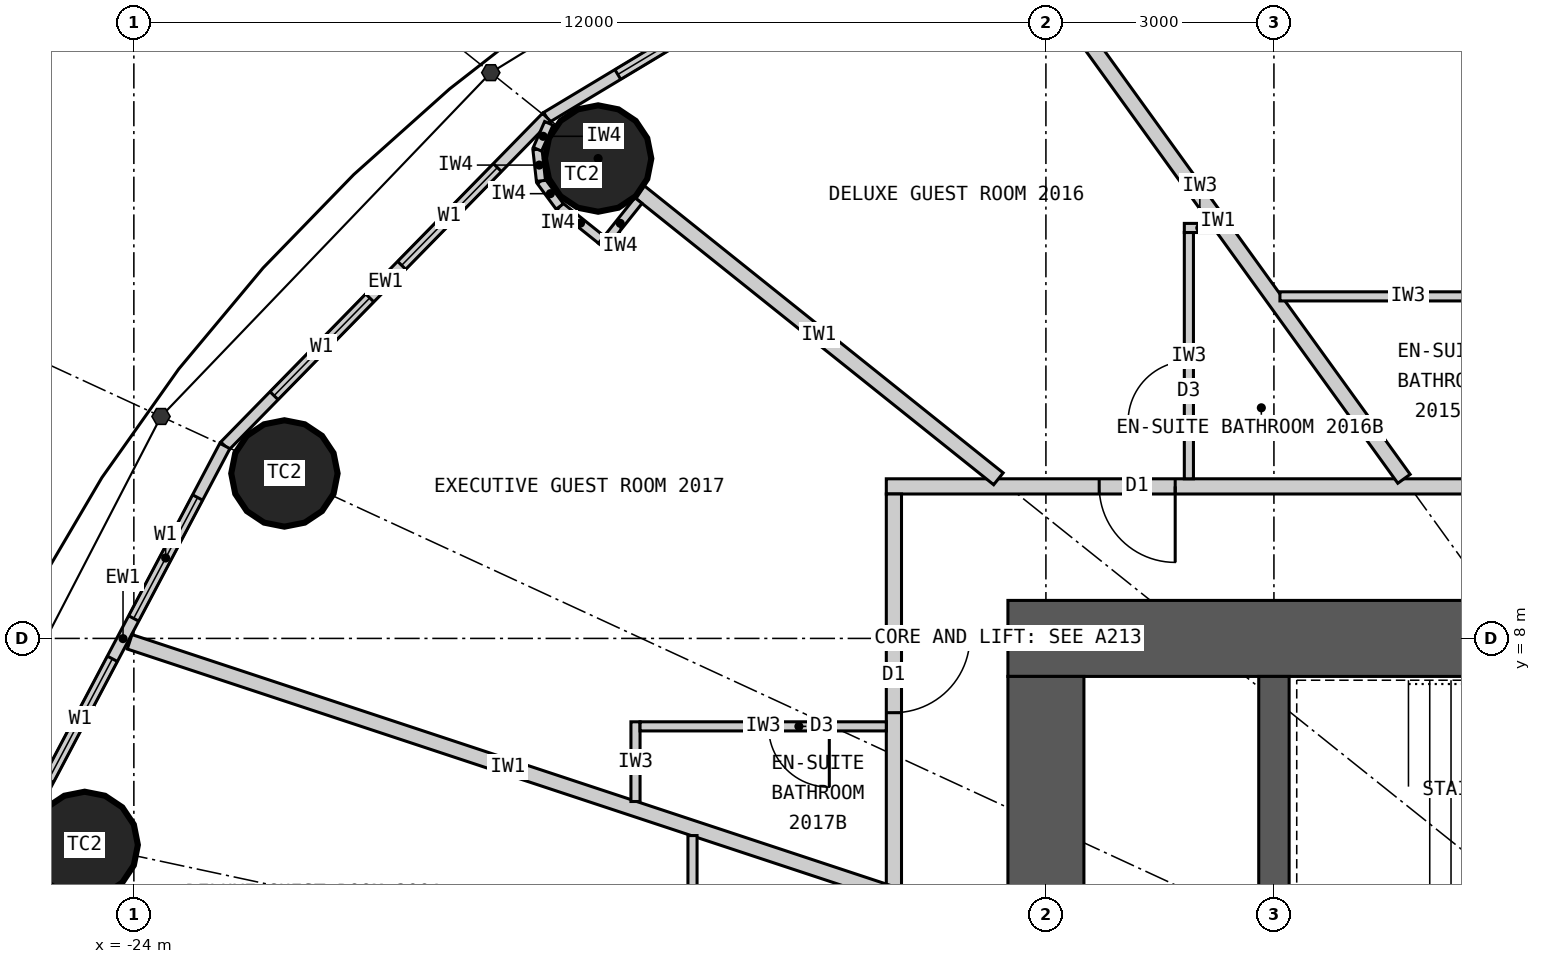
"""IFC4 building model, lengths in metres.
Left out: names, types, materials, properties, quantities, classifications, styles, units other than length and angle.
Written with IfcOpenShell. Run it as: python <this file> out.ifc"""

import sys

from ifc_helpers import new_model, si_unit, direction, frame, frame_2d, origin, origin_2d, place, context, subcontext, project, spatial, rectangle, circle, extrude, element, fill, save


model = new_model("IFC4")
c1 = context("Model", 3, precision=1e-05, world=origin(), true_north=direction((0.0, 1.0)))
c2 = subcontext(c1, "Body", "Model", "MODEL_VIEW")
j1 = project(units=[si_unit("LENGTHUNIT", "METRE"), si_unit("PLANEANGLEUNIT", "RADIAN")], contexts=[c1])
p1 = place(None, origin())
s1 = spatial("IfcSite", under=j1, at=p1, CompositionType="ELEMENT")
p2 = place(p1, origin())
s2 = spatial("IfcBuilding", under=s1, at=p2, CompositionType="ELEMENT")
p3 = place(p2, frame((0.0, 0.0, 80.4)))
s3 = spatial("IfcBuildingStorey", under=s2, at=p3, CompositionType="ELEMENT", Elevation=80.4)
for number, where, z_axis, x_axis in (
    (1, (-17.892, 14.313, 0.0), (0.0, 0.0, 1.0), (1.0, 0.0, 0.0)),
    (2, (-22.019, 10.17, 0.0), (0.0, 0.0, 1.0), (1.0, 0.0, 0.0)),
    (3, (-24.647, 5.283, 0.0), (0.0, 0.0, 1.0), (1.0, 0.0, 0.0)),
):
    element("IfcColumn", number, at=place(p3, frame(where, z_axis=z_axis, x_axis=x_axis)), inside=s3, PredefinedType="COLUMN", context=c2, shape_type="SweptSolid", body=[
        extrude(circle(Radius=0.7, at=origin_2d()), origin(), (0.0, 0.0, 1.0), 3.3),
    ])
p4 = place(p3, frame((-12.5, 8.0, 0.0), z_axis=(0.0, 0.0, 1.0), x_axis=(1.0, 0.0, 0.0)))
e4 = element("IfcWall", 4, at=p4, inside=s3, PredefinedType="SHEAR", context=c2, shape_type="SweptSolid", body=[
    extrude(rectangle(XDim=25.0, YDim=1.0, at=frame_2d((12.5, 0.0))), origin(), (0.0, 0.0, 1.0), 3.3),
])
p5 = place(p4, frame((11.2, 0.0, 0.0)))
e5 = element("IfcOpeningElement", 5, at=p5, cuts=e4, PredefinedType="OPENING", context=c2, shape_type="SweptSolid", body=[
    extrude(rectangle(XDim=1.2, YDim=2.2, at=frame_2d((0.6, 1.1))), frame((0.0, 0.51, 0.0), z_axis=(0.0, -1.0, 0.0), x_axis=(1.0, 0.0, 0.0)), (0.0, 0.0, 1.0), 1.02),
])
p6 = place(p4, frame((18.8, 0.0, 0.0)))
e6 = element("IfcOpeningElement", 6, at=p6, cuts=e4, PredefinedType="OPENING", context=c2, shape_type="SweptSolid", body=[
    extrude(rectangle(XDim=0.9, YDim=2.2, at=frame_2d((0.45, 1.1))), frame((0.0, 0.51, 0.0), z_axis=(0.0, -1.0, 0.0), x_axis=(1.0, 0.0, 0.0)), (0.0, 0.0, 1.0), 1.02),
])
p7 = place(p3, frame((-12.0, 7.5, 0.0), z_axis=(0.0, 0.0, 1.0), x_axis=(0.0, -1.0, 0.0)))
e7 = element("IfcWall", 7, at=p7, inside=s3, PredefinedType="SHEAR", context=c2, shape_type="SweptSolid", body=[
    extrude(rectangle(XDim=15.0, YDim=1.0, at=frame_2d((7.5, 0.0))), origin(), (0.0, 0.0, 1.0), 3.3),
])
p8 = place(p7, frame((6.6, 0.0, 0.0)))
e8 = element("IfcOpeningElement", 8, at=p8, cuts=e7, PredefinedType="OPENING", context=c2, shape_type="SweptSolid", body=[
    extrude(rectangle(XDim=1.8, YDim=2.2, at=frame_2d((0.9, 1.1))), frame((0.0, 0.51, 0.0), z_axis=(0.0, -1.0, 0.0), x_axis=(1.0, 0.0, 0.0)), (0.0, 0.0, 1.0), 1.02),
])
p9 = place(p3, frame((-9.0, 4.5, 0.0), z_axis=(0.0, 0.0, 1.0), x_axis=(0.0, 1.0, 0.0)))
e9 = element("IfcWall", 9, at=p9, inside=s3, PredefinedType="SHEAR", context=c2, shape_type="SweptSolid", body=[
    extrude(rectangle(XDim=3.0, YDim=0.4, at=frame_2d((1.5, 0.0))), origin(), (0.0, 0.0, 1.0), 3.3),
])
p10 = place(p3, frame((-13.096, 18.147, 0.0), z_axis=(0.0, 0.0, 1.0), x_axis=(-0.856983180864, -0.515344377787, 0.0)))
e10 = element("IfcWall", 10, at=p10, inside=s3, PredefinedType="ELEMENTEDWALL", context=c2, shape_type="SweptSolid", body=[
    extrude(rectangle(XDim=6.386, YDim=0.15, at=frame_2d((3.193, 0.0))), origin(), (0.0, 0.0, 1.0), 3.12),
])
p11 = place(p10, frame((1.093, 0.0, 0.9)))
e11 = element("IfcOpeningElement", 11, at=p11, cuts=e10, PredefinedType="OPENING", context=c2, shape_type="SweptSolid", body=[
    extrude(rectangle(XDim=1.8, YDim=1.9, at=frame_2d((0.9, 0.95))), frame((0.0, 0.085, 0.0), z_axis=(0.0, -1.0, 0.0), x_axis=(1.0, 0.0, 0.0)), (0.0, 0.0, 1.0), 0.17),
])
p12 = place(p10, frame((3.493, 0.0, 0.9)))
e12 = element("IfcOpeningElement", 12, at=p12, cuts=e10, PredefinedType="OPENING", context=c2, shape_type="SweptSolid", body=[
    extrude(rectangle(XDim=1.8, YDim=1.9, at=frame_2d((0.9, 0.95))), frame((0.0, 0.085, 0.0), z_axis=(0.0, -1.0, 0.0), x_axis=(1.0, 0.0, 0.0)), (0.0, 0.0, 1.0), 0.17),
])
p13 = place(p3, frame((-18.57, 14.856, 0.0), z_axis=(0.0, 0.0, 1.0), x_axis=(-0.699602905915, -0.714531856557, 0.0)))
e13 = element("IfcWall", 13, at=p13, inside=s3, PredefinedType="ELEMENTEDWALL", context=c2, shape_type="SweptSolid", body=[
    extrude(rectangle(XDim=6.051, YDim=0.15, at=frame_2d((3.025, 0.0))), origin(), (0.0, 0.0, 1.0), 3.12),
])
p14 = place(p13, frame((0.926, 0.0, 0.9)))
e14 = element("IfcOpeningElement", 14, at=p14, cuts=e13, PredefinedType="OPENING", context=c2, shape_type="SweptSolid", body=[
    extrude(rectangle(XDim=1.8, YDim=1.9, at=frame_2d((0.9, 0.95))), frame((0.0, 0.085, 0.0), z_axis=(0.0, -1.0, 0.0), x_axis=(1.0, 0.0, 0.0)), (0.0, 0.0, 1.0), 0.17),
])
p15 = place(p13, frame((3.325, 0.0, 0.9)))
e15 = element("IfcOpeningElement", 15, at=p15, cuts=e13, PredefinedType="OPENING", context=c2, shape_type="SweptSolid", body=[
    extrude(rectangle(XDim=1.8, YDim=1.9, at=frame_2d((0.9, 0.95))), frame((0.0, 0.085, 0.0), z_axis=(0.0, -1.0, 0.0), x_axis=(1.0, 0.0, 0.0)), (0.0, 0.0, 1.0), 0.17),
])
p16 = place(p3, frame((-22.803, 10.532, 0.0), z_axis=(0.0, 0.0, 1.0), x_axis=(-0.467296867008, -0.884100468321, 0.0)))
e16 = element("IfcWall", 16, at=p16, inside=s3, PredefinedType="ELEMENTEDWALL", context=c2, shape_type="SweptSolid", body=[
    extrude(rectangle(XDim=5.734, YDim=0.15, at=frame_2d((2.867, 0.0))), origin(), (0.0, 0.0, 1.0), 3.12),
])
p17 = place(p16, frame((0.767, 0.0, 0.9)))
e17 = element("IfcOpeningElement", 17, at=p17, cuts=e16, PredefinedType="OPENING", context=c2, shape_type="SweptSolid", body=[
    extrude(rectangle(XDim=1.8, YDim=1.9, at=frame_2d((0.9, 0.95))), frame((0.0, 0.085, 0.0), z_axis=(0.0, -1.0, 0.0), x_axis=(1.0, 0.0, 0.0)), (0.0, 0.0, 1.0), 0.17),
])
p18 = place(p16, frame((3.167, 0.0, 0.9)))
e18 = element("IfcOpeningElement", 18, at=p18, cuts=e16, PredefinedType="OPENING", context=c2, shape_type="SweptSolid", body=[
    extrude(rectangle(XDim=1.8, YDim=1.9, at=frame_2d((0.9, 0.95))), frame((0.0, 0.085, 0.0), z_axis=(0.0, -1.0, 0.0), x_axis=(1.0, 0.0, 0.0)), (0.0, 0.0, 1.0), 0.17),
])
p19 = place(p3, frame((-14.1, 10.0, 0.0), z_axis=(0.0, 0.0, 1.0), x_axis=(1.0, 0.0, 0.0)))
e19 = element("IfcWall", 19, at=p19, inside=s3, PredefinedType="PARTITIONING", context=c2, shape_type="SweptSolid", body=[
    extrude(rectangle(XDim=28.2, YDim=0.2, at=frame_2d((14.1, 0.0))), origin(), (0.0, 0.0, 1.0), 3.12),
])
p20 = place(p19, frame((23.865, 0.0, 0.0)))
e20 = element("IfcOpeningElement", 20, at=p20, cuts=e19, PredefinedType="OPENING", context=c2, shape_type="SweptSolid", body=[
    extrude(rectangle(XDim=1.0, YDim=2.2, at=frame_2d((0.5, 1.1))), frame((0.0, 0.11, 0.0), z_axis=(0.0, -1.0, 0.0), x_axis=(1.0, 0.0, 0.0)), (0.0, 0.0, 1.0), 0.22),
])
p21 = place(p19, frame((18.529, 0.0, 0.0)))
e21 = element("IfcOpeningElement", 21, at=p21, cuts=e19, PredefinedType="OPENING", context=c2, shape_type="SweptSolid", body=[
    extrude(rectangle(XDim=1.0, YDim=2.2, at=frame_2d((0.5, 1.1))), frame((0.0, 0.11, 0.0), z_axis=(0.0, -1.0, 0.0), x_axis=(1.0, 0.0, 0.0)), (0.0, 0.0, 1.0), 0.22),
])
p22 = place(p19, frame((14.623, 0.0, 0.0)))
e22 = element("IfcOpeningElement", 22, at=p22, cuts=e19, PredefinedType="OPENING", context=c2, shape_type="SweptSolid", body=[
    extrude(rectangle(XDim=1.0, YDim=2.2, at=frame_2d((0.5, 1.1))), frame((0.0, 0.11, 0.0), z_axis=(0.0, -1.0, 0.0), x_axis=(1.0, 0.0, 0.0)), (0.0, 0.0, 1.0), 0.22),
])
p23 = place(p19, frame((11.24, 0.0, 0.0)))
e23 = element("IfcOpeningElement", 23, at=p23, cuts=e19, PredefinedType="OPENING", context=c2, shape_type="SweptSolid", body=[
    extrude(rectangle(XDim=1.0, YDim=2.2, at=frame_2d((0.5, 1.1))), frame((0.0, 0.11, 0.0), z_axis=(0.0, -1.0, 0.0), x_axis=(1.0, 0.0, 0.0)), (0.0, 0.0, 1.0), 0.22),
])
p24 = place(p19, frame((8.671, 0.0, 0.0)))
e24 = element("IfcOpeningElement", 24, at=p24, cuts=e19, PredefinedType="OPENING", context=c2, shape_type="SweptSolid", body=[
    extrude(rectangle(XDim=1.0, YDim=2.2, at=frame_2d((0.5, 1.1))), frame((0.0, 0.11, 0.0), z_axis=(0.0, -1.0, 0.0), x_axis=(1.0, 0.0, 0.0)), (0.0, 0.0, 1.0), 0.22),
])
p25 = place(p19, frame((2.801, 0.0, 0.0)))
e25 = element("IfcOpeningElement", 25, at=p25, cuts=e19, PredefinedType="OPENING", context=c2, shape_type="SweptSolid", body=[
    extrude(rectangle(XDim=1.0, YDim=2.2, at=frame_2d((0.5, 1.1))), frame((0.0, 0.11, 0.0), z_axis=(0.0, -1.0, 0.0), x_axis=(1.0, 0.0, 0.0)), (0.0, 0.0, 1.0), 0.22),
])
p26 = place(p3, frame((-14.0, 9.9, 0.0), z_axis=(0.0, 0.0, 1.0), x_axis=(0.0, -1.0, 0.0)))
e26 = element("IfcWall", 26, at=p26, inside=s3, PredefinedType="PARTITIONING", context=c2, shape_type="SweptSolid", body=[
    extrude(rectangle(XDim=19.8, YDim=0.2, at=frame_2d((9.9, 0.0))), origin(), (0.0, 0.0, 1.0), 3.12),
])
p27 = place(p26, frame((7.097, 0.0, 0.0)))
e27 = element("IfcOpeningElement", 27, at=p27, cuts=e26, PredefinedType="OPENING", context=c2, shape_type="SweptSolid", body=[
    extrude(rectangle(XDim=1.0, YDim=2.2, at=frame_2d((0.5, 1.1))), frame((0.0, 0.11, 0.0), z_axis=(0.0, -1.0, 0.0), x_axis=(1.0, 0.0, 0.0)), (0.0, 0.0, 1.0), 0.22),
])
p28 = place(p26, frame((10.778, 0.0, 0.0)))
e28 = element("IfcOpeningElement", 28, at=p28, cuts=e26, PredefinedType="OPENING", context=c2, shape_type="SweptSolid", body=[
    extrude(rectangle(XDim=1.0, YDim=2.2, at=frame_2d((0.5, 1.1))), frame((0.0, 0.11, 0.0), z_axis=(0.0, -1.0, 0.0), x_axis=(1.0, 0.0, 0.0)), (0.0, 0.0, 1.0), 0.22),
])
p29 = place(p26, frame((13.552, 0.0, 0.0)))
e29 = element("IfcOpeningElement", 29, at=p29, cuts=e26, PredefinedType="OPENING", context=c2, shape_type="SweptSolid", body=[
    extrude(rectangle(XDim=1.0, YDim=2.2, at=frame_2d((0.5, 1.1))), frame((0.0, 0.11, 0.0), z_axis=(0.0, -1.0, 0.0), x_axis=(1.0, 0.0, 0.0)), (0.0, 0.0, 1.0), 0.22),
])
p30 = place(p26, frame((18.698, 0.0, 0.0)))
e30 = element("IfcOpeningElement", 30, at=p30, cuts=e26, PredefinedType="OPENING", context=c2, shape_type="SweptSolid", body=[
    extrude(rectangle(XDim=1.0, YDim=2.2, at=frame_2d((0.5, 1.1))), frame((0.0, 0.11, 0.0), z_axis=(0.0, -1.0, 0.0), x_axis=(1.0, 0.0, 0.0)), (0.0, 0.0, 1.0), 0.22),
])
p31 = place(p26, frame((1.877, 0.0, 0.0)))
e31 = element("IfcOpeningElement", 31, at=p31, cuts=e26, PredefinedType="OPENING", context=c2, shape_type="SweptSolid", body=[
    extrude(rectangle(XDim=1.0, YDim=2.2, at=frame_2d((0.5, 1.1))), frame((0.0, 0.11, 0.0), z_axis=(0.0, -1.0, 0.0), x_axis=(1.0, 0.0, 0.0)), (0.0, 0.0, 1.0), 0.22),
])
p32 = place(p3, frame((-7.289, 10.1, 0.0), z_axis=(0.0, 0.0, 1.0), x_axis=(-0.585198353053, 0.810890182197, 0.0)))
e32 = element("IfcWall", 32, at=p32, inside=s3, PredefinedType="PARTITIONING", context=c2, shape_type="SweptSolid", body=[
    extrude(rectangle(XDim=8.36, YDim=0.2, at=frame_2d((4.18, 0.0))), origin(), (0.0, 0.0, 1.0), 2.32),
])
p33 = place(p3, frame((-12.625, 10.1, 0.0), z_axis=(0.0, 0.0, 1.0), x_axis=(-0.780892451574, 0.624665493744, 0.0)))
e33 = element("IfcWall", 33, at=p33, inside=s3, PredefinedType="PARTITIONING", context=c2, shape_type="SweptSolid", body=[
    extrude(rectangle(XDim=6.045, YDim=0.2, at=frame_2d((3.022, 0.0))), origin(), (0.0, 0.0, 1.0), 2.32),
])
p34 = place(p3, frame((-14.1, 4.663, 0.0), z_axis=(0.0, 0.0, 1.0), x_axis=(-0.949432655039, 0.31397075269, 0.0)))
e34 = element("IfcWall", 34, at=p34, inside=s3, PredefinedType="PARTITIONING", context=c2, shape_type="SweptSolid", body=[
    extrude(rectangle(XDim=10.486, YDim=0.2, at=frame_2d((5.243, 0.0))), origin(), (0.0, 0.0, 1.0), 3.12),
])
p35 = place(p3, frame((-16.65, 5.406, 0.0), z_axis=(0.0, 0.0, 1.0), x_axis=(0.0, -1.0, 0.0)))
e35 = element("IfcWall", 35, at=p35, inside=s3, PredefinedType="PARTITIONING", context=c2, shape_type="SweptSolid", body=[
    extrude(rectangle(XDim=2.483, YDim=0.12, at=frame_2d((1.242, 0.0))), origin(), (0.0, 0.0, 1.0), 3.12),
])
p36 = place(p3, frame((-8.921, 12.5, 0.0), z_axis=(0.0, 0.0, 1.0), x_axis=(1.0, 0.0, 0.0)))
e36 = element("IfcWall", 36, at=p36, inside=s3, PredefinedType="PARTITIONING", context=c2, shape_type="SweptSolid", body=[
    extrude(rectangle(XDim=3.372, YDim=0.12, at=frame_2d((1.686, 0.0))), origin(), (0.0, 0.0, 1.0), 3.12),
])
p37 = place(p3, frame((-9.771, 13.4, 0.0), z_axis=(0.0, 0.0, 1.0), x_axis=(-1.0, 0.0, 0.0)))
e37 = element("IfcWall", 37, at=p37, inside=s3, PredefinedType="PARTITIONING", context=c2, shape_type="SweptSolid", body=[
    extrude(rectangle(XDim=0.408, YDim=0.12, at=frame_2d((0.204, 0.0))), origin(), (0.0, 0.0, 1.0), 3.12),
])
p38 = place(p3, frame((-10.119, 10.1, 0.0), z_axis=(0.0, 0.0, 1.0), x_axis=(0.0, 1.0, 0.0)))
e38 = element("IfcWall", 38, at=p38, inside=s3, PredefinedType="PARTITIONING", context=c2, shape_type="SweptSolid", body=[
    extrude(rectangle(XDim=3.24, YDim=0.12, at=frame_2d((1.62, 0.0))), origin(), (0.0, 0.0, 1.0), 3.12),
])
p39 = place(p38, frame((0.75, 0.0, 0.0)))
e39 = element("IfcOpeningElement", 39, at=p39, cuts=e38, PredefinedType="OPENING", context=c2, shape_type="SweptSolid", body=[
    extrude(rectangle(XDim=0.8, YDim=2.1, at=frame_2d((0.4, 1.05))), frame((0.0, 0.07, 0.0), z_axis=(0.0, -1.0, 0.0), x_axis=(1.0, 0.0, 0.0)), (0.0, 0.0, 1.0), 0.14),
])
p40 = place(p3, frame((-17.4, 5.854, 0.0), z_axis=(0.0, 0.0, 1.0), x_axis=(0.0, 1.0, 0.0)))
e40 = element("IfcWall", 40, at=p40, inside=s3, PredefinedType="PARTITIONING", context=c2, shape_type="SweptSolid", body=[
    extrude(rectangle(XDim=1.049, YDim=0.12, at=frame_2d((0.524, 0.0))), origin(), (0.0, 0.0, 1.0), 3.12),
])
p41 = place(p3, frame((-14.1, 6.843, 0.0), z_axis=(0.0, 0.0, 1.0), x_axis=(-1.0, 0.0, 0.0)))
e41 = element("IfcWall", 41, at=p41, inside=s3, PredefinedType="PARTITIONING", context=c2, shape_type="SweptSolid", body=[
    extrude(rectangle(XDim=3.24, YDim=0.12, at=frame_2d((1.62, 0.0))), origin(), (0.0, 0.0, 1.0), 3.12),
])
p42 = place(p41, frame((0.75, 0.0, 0.0)))
e42 = element("IfcOpeningElement", 42, at=p42, cuts=e41, PredefinedType="OPENING", context=c2, shape_type="SweptSolid", body=[
    extrude(rectangle(XDim=0.8, YDim=2.1, at=frame_2d((0.4, 1.05))), frame((0.0, 0.07, 0.0), z_axis=(0.0, -1.0, 0.0), x_axis=(1.0, 0.0, 0.0)), (0.0, 0.0, 1.0), 0.14),
])
p43 = place(p3, frame((-17.361, 13.76, 0.0), z_axis=(0.0, 0.0, 1.0), x_axis=(-0.624501042889, -0.781023973659, 0.0)))
e43 = element("IfcWall", 43, at=p43, inside=s3, PredefinedType="PARTITIONING", context=c2, shape_type="SweptSolid", body=[
    extrude(rectangle(XDim=0.767, YDim=0.12, at=frame_2d((0.384, 0.0))), origin(), (0.0, 0.0, 1.0), 3.12),
])
p44 = place(p3, frame((-17.85, 13.246, 0.0), z_axis=(0.0, 0.0, 1.0), x_axis=(-0.780902834923, 0.62465251333, 0.0)))
e44 = element("IfcWall", 44, at=p44, inside=s3, PredefinedType="PARTITIONING", context=c2, shape_type="SweptSolid", body=[
    extrude(rectangle(XDim=0.7, YDim=0.12, at=frame_2d((0.35, 0.0))), origin(), (0.0, 0.0, 1.0), 3.12),
])
for number, where, z_axis, x_axis in (
    (45, (-18.396, 13.683, 0.0), (0.0, 0.0, 1.0), (-0.592, 0.806, 0.0)),
    (46, (-18.644, 14.02, 0.0), (0.0, 0.0, 1.0), (-0.11, 0.994, 0.0)),
):
    element("IfcWall", number, at=place(p3, frame(where, z_axis=z_axis, x_axis=x_axis)), inside=s3, PredefinedType="PARTITIONING", context=c2, shape_type="SweptSolid", body=[
        extrude(rectangle(XDim=0.418, YDim=0.12, at=frame_2d((0.209, 0.0))), origin(), (0.0, 0.0, 1.0), 3.12),
    ])
p45 = place(p3, frame((-18.69, 14.435, 0.0), z_axis=(0.0, 0.0, 1.0), x_axis=(0.401093412634, 0.91603715773, 0.0)))
e47 = element("IfcWall", 47, at=p45, inside=s3, PredefinedType="PARTITIONING", context=c2, shape_type="SweptSolid", body=[
    extrude(rectangle(XDim=0.373, YDim=0.12, at=frame_2d((0.187, 0.0))), origin(), (0.0, 0.0, 1.0), 3.12),
])
p46 = place(p12, origin())
e48 = element("IfcWindow", 48, at=p46, inside=s3, PartitioningType="SINGLE_PANEL", PredefinedType="WINDOW", context=c2, shape_type="SweptSolid", body=[
    extrude(rectangle(XDim=1.8, YDim=1.9, at=frame_2d((0.9, 0.95))), frame((0.0, 0.03, 0.0), z_axis=(0.0, -1.0, 0.0), x_axis=(1.0, 0.0, 0.0)), (0.0, 0.0, 1.0), 0.06),
])
fill(e12, e48)
p47 = place(p14, origin())
e49 = element("IfcWindow", 49, at=p47, inside=s3, PartitioningType="SINGLE_PANEL", PredefinedType="WINDOW", context=c2, shape_type="SweptSolid", body=[
    extrude(rectangle(XDim=1.8, YDim=1.9, at=frame_2d((0.9, 0.95))), frame((0.0, 0.03, 0.0), z_axis=(0.0, -1.0, 0.0), x_axis=(1.0, 0.0, 0.0)), (0.0, 0.0, 1.0), 0.06),
])
fill(e14, e49)
p48 = place(p15, origin())
e50 = element("IfcWindow", 50, at=p48, inside=s3, PartitioningType="SINGLE_PANEL", PredefinedType="WINDOW", context=c2, shape_type="SweptSolid", body=[
    extrude(rectangle(XDim=1.8, YDim=1.9, at=frame_2d((0.9, 0.95))), frame((0.0, 0.03, 0.0), z_axis=(0.0, -1.0, 0.0), x_axis=(1.0, 0.0, 0.0)), (0.0, 0.0, 1.0), 0.06),
])
fill(e15, e50)
p49 = place(p17, origin())
e51 = element("IfcWindow", 51, at=p49, inside=s3, PartitioningType="SINGLE_PANEL", PredefinedType="WINDOW", context=c2, shape_type="SweptSolid", body=[
    extrude(rectangle(XDim=1.8, YDim=1.9, at=frame_2d((0.9, 0.95))), frame((0.0, 0.03, 0.0), z_axis=(0.0, -1.0, 0.0), x_axis=(1.0, 0.0, 0.0)), (0.0, 0.0, 1.0), 0.06),
])
fill(e17, e51)
p50 = place(p18, origin())
e52 = element("IfcWindow", 52, at=p50, inside=s3, PartitioningType="SINGLE_PANEL", PredefinedType="WINDOW", context=c2, shape_type="SweptSolid", body=[
    extrude(rectangle(XDim=1.8, YDim=1.9, at=frame_2d((0.9, 0.95))), frame((0.0, 0.03, 0.0), z_axis=(0.0, -1.0, 0.0), x_axis=(1.0, 0.0, 0.0)), (0.0, 0.0, 1.0), 0.06),
])
fill(e18, e52)
p51 = place(p39, origin())
e53 = element("IfcDoor", 53, at=p51, inside=s3, OperationType="SINGLE_SWING_LEFT", PredefinedType="DOOR", context=c2, shape_type="SweptSolid", body=[
    extrude(rectangle(XDim=0.8, YDim=2.1, at=frame_2d((0.4, 1.05))), frame((0.0, 0.025, 0.0), z_axis=(0.0, -1.0, 0.0), x_axis=(1.0, 0.0, 0.0)), (0.0, 0.0, 1.0), 0.05),
])
fill(e39, e53)
p52 = place(p25, origin())
e54 = element("IfcDoor", 54, at=p52, inside=s3, OperationType="SINGLE_SWING_RIGHT", PredefinedType="DOOR", context=c2, shape_type="SweptSolid", body=[
    extrude(rectangle(XDim=1.0, YDim=2.2, at=frame_2d((0.5, 1.1))), frame((0.0, 0.025, 0.0), z_axis=(0.0, -1.0, 0.0), x_axis=(1.0, 0.0, 0.0)), (0.0, 0.0, 1.0), 0.05),
])
fill(e25, e54)
p53 = place(p42, origin())
e55 = element("IfcDoor", 55, at=p53, inside=s3, OperationType="SINGLE_SWING_LEFT", PredefinedType="DOOR", context=c2, shape_type="SweptSolid", body=[
    extrude(rectangle(XDim=0.8, YDim=2.1, at=frame_2d((0.4, 1.05))), frame((0.0, 0.025, 0.0), z_axis=(0.0, -1.0, 0.0), x_axis=(1.0, 0.0, 0.0)), (0.0, 0.0, 1.0), 0.05),
])
fill(e42, e55)
p54 = place(p31, origin())
e56 = element("IfcDoor", 56, at=p54, inside=s3, OperationType="SINGLE_SWING_LEFT", PredefinedType="DOOR", context=c2, shape_type="SweptSolid", body=[
    extrude(rectangle(XDim=1.0, YDim=2.2, at=frame_2d((0.5, 1.1))), frame((0.0, 0.025, 0.0), z_axis=(0.0, -1.0, 0.0), x_axis=(1.0, 0.0, 0.0)), (0.0, 0.0, 1.0), 0.05),
])
fill(e31, e56)
save(model, sys.argv[1])
